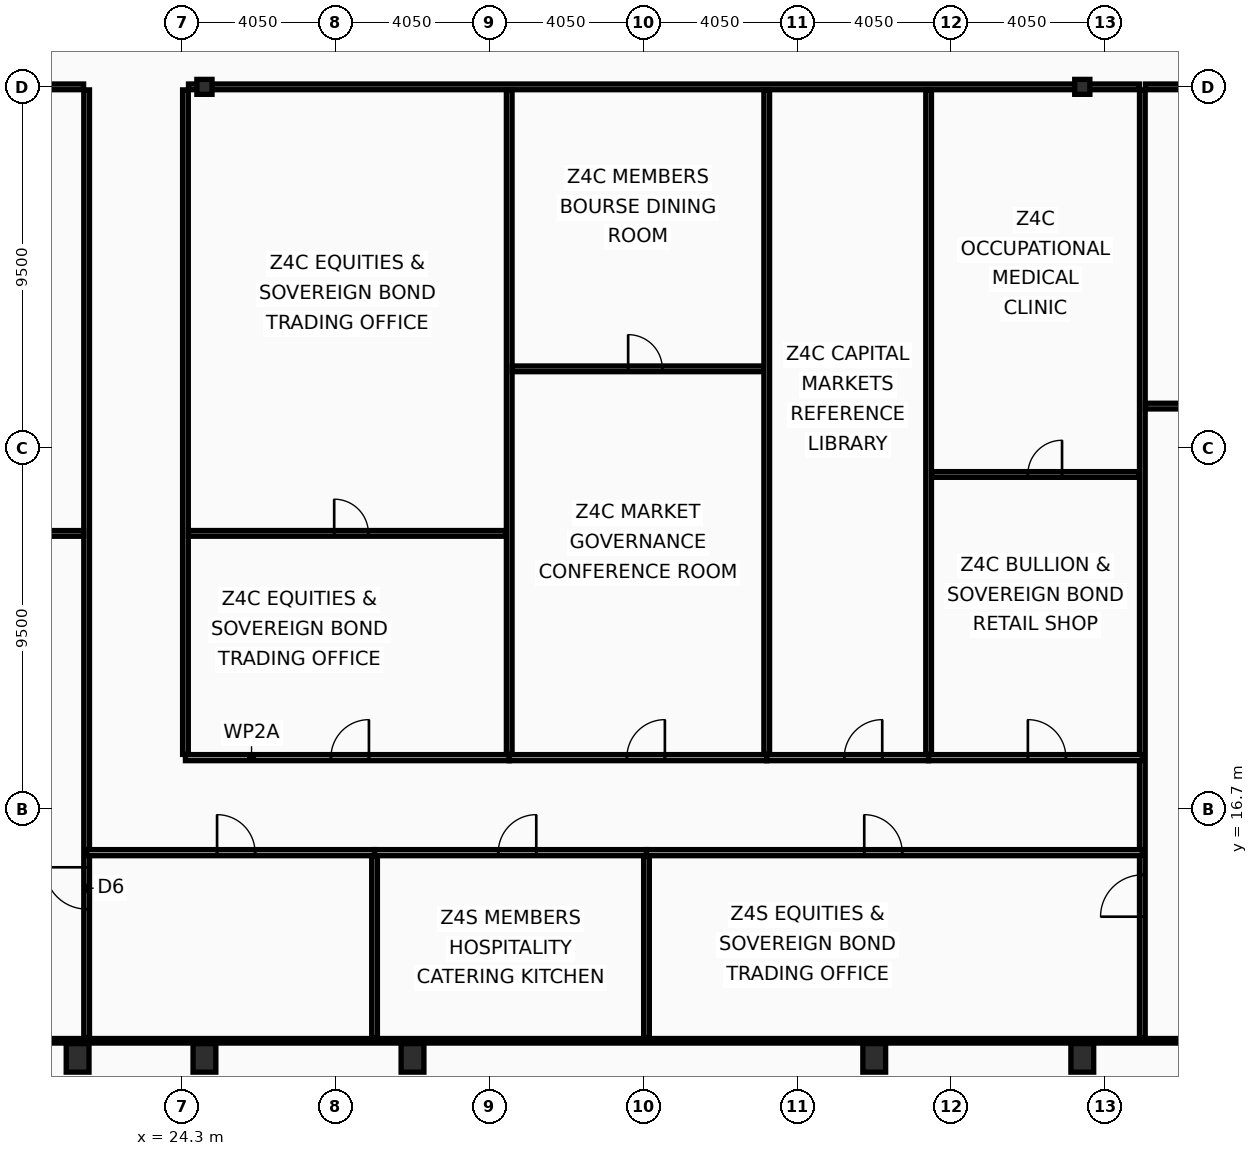
"""IFC4 building model, lengths in metres.
Left out: names, types, materials, properties, quantities, classifications, styles, units other than length and angle.
Written with IfcOpenShell. Run it as: python <this file> out.ifc"""

import sys

from ifc_helpers import new_model, si_unit, direction, frame, frame_2d, origin, origin_2d, place, context, subcontext, project, spatial, rectangle, hollow_rectangle, i_section, extrude, element, fill, save


model = new_model("IFC4")
c1 = context("Model", 3, precision=1e-05, world=origin(), true_north=direction((0.0, 1.0)))
c2 = subcontext(c1, "Body", "Model", "MODEL_VIEW")
j1 = project(units=[si_unit("LENGTHUNIT", "METRE"), si_unit("PLANEANGLEUNIT", "RADIAN")], contexts=[c1])
p1 = place(None, origin())
s1 = spatial("IfcSite", under=j1, at=p1, CompositionType="ELEMENT")
p2 = place(p1, origin())
s2 = spatial("IfcBuilding", under=s1, at=p2, CompositionType="ELEMENT")
p3 = place(p2, frame((0.0, 0.0, 280.6)))
s3 = spatial("IfcBuildingStorey", under=s2, at=p3, CompositionType="ELEMENT", Elevation=280.6)
for number, where, z_axis, x_axis in (
    (1, (21.562, 10.15, 0.0), (0.0, 0.0, 1.0), (1.0, 0.0, 0.0)),
    (2, (24.9, 10.15, 0.0), (0.0, 0.0, 1.0), (1.0, 0.0, 0.0)),
    (3, (30.375, 10.15, 0.0), (0.0, 0.0, 1.0), (1.0, 0.0, 0.0)),
    (4, (42.525, 10.15, 0.0), (0.0, 0.0, 1.0), (1.0, 0.0, 0.0)),
    (5, (48.0, 10.15, 0.0), (0.0, 0.0, 1.0), (1.0, 0.0, 0.0)),
):
    element("IfcColumn", number, at=place(p3, frame(where, z_axis=z_axis, x_axis=x_axis)), inside=s3, PredefinedType="COLUMN", context=c2, shape_type="SweptSolid", body=[
        extrude(hollow_rectangle(XDim=0.6, YDim=0.75, WallThickness=0.045, at=origin_2d()), origin(), (0.0, 0.0, 1.0), 3.6),
    ])
for number, where, z_axis, x_axis in (
    (6, (24.9, 35.7, 0.0), (0.0, 0.0, 1.0), (1.0, 0.0, 0.0)),
    (7, (48.0, 35.7, 0.0), (0.0, 0.0, 1.0), (1.0, 0.0, 0.0)),
):
    element("IfcColumn", number, at=place(p3, frame(where, z_axis=z_axis, x_axis=x_axis)), inside=s3, PredefinedType="COLUMN", context=c2, shape_type="SweptSolid", body=[
        extrude(i_section(OverallWidth=0.399, OverallDepth=0.393, WebThickness=0.023, FlangeThickness=0.037, at=origin_2d()), origin(), (0.0, 0.0, 1.0), 3.6),
    ])
p4 = place(p3, frame((21.8, 10.665, 0.0), z_axis=(0.0, 0.0, 1.0), x_axis=(0.0, 1.0, 0.0)))
e8 = element("IfcWall", 8, at=p4, inside=s3, PredefinedType="PARTITIONING", context=c2, shape_type="SweptSolid", body=[
    extrude(rectangle(XDim=24.955, YDim=0.15, at=frame_2d((12.478, 0.0))), origin(), (0.0, 0.0, 1.0), 3.03),
])
p5 = place(p4, frame((3.4, 0.0, 0.0)))
e9 = element("IfcOpeningElement", 9, at=p5, cuts=e8, PredefinedType="OPENING", context=c2, shape_type="SweptSolid", body=[
    extrude(rectangle(XDim=1.1, YDim=2.1, at=frame_2d((0.55, 1.05))), frame((0.0, 0.085, 0.0), z_axis=(0.0, -1.0, 0.0), x_axis=(1.0, 0.0, 0.0)), (0.0, 0.0, 1.0), 0.17),
])
p6 = place(p3, frame((10.095, 35.7, 0.0), z_axis=(0.0, 0.0, 1.0), x_axis=(1.0, 0.0, 0.0)))
e10 = element("IfcWall", 10, at=p6, inside=s3, PredefinedType="PARTITIONING", context=c2, shape_type="SweptSolid", body=[
    extrude(rectangle(XDim=11.625, YDim=0.15, at=frame_2d((5.812, 0.0))), origin(), (0.0, 0.0, 1.0), 2.78),
])
p7 = place(p6, frame((2.8, 0.0, 0.0)))
e11 = element("IfcOpeningElement", 11, at=p7, cuts=e10, PredefinedType="OPENING", context=c2, shape_type="SweptSolid", body=[
    extrude(rectangle(XDim=1.0, YDim=2.05, at=frame_2d((0.5, 1.025))), frame((0.0, 0.085, 0.0), z_axis=(0.0, -1.0, 0.0), x_axis=(1.0, 0.0, 0.0)), (0.0, 0.0, 1.0), 0.17),
])
p8 = place(p3, frame((10.095, 23.95, 0.0), z_axis=(0.0, 0.0, 1.0), x_axis=(1.0, 0.0, 0.0)))
e12 = element("IfcWall", 12, at=p8, inside=s3, PredefinedType="PARTITIONING", context=c2, shape_type="SweptSolid", body=[
    extrude(rectangle(XDim=11.625, YDim=0.15, at=frame_2d((5.812, 0.0))), origin(), (0.0, 0.0, 1.0), 2.78),
])
p9 = place(p8, frame((2.2, 0.0, 0.0)))
e13 = element("IfcOpeningElement", 13, at=p9, cuts=e12, PredefinedType="OPENING", context=c2, shape_type="SweptSolid", body=[
    extrude(rectangle(XDim=0.9, YDim=2.05, at=frame_2d((0.45, 1.025))), frame((0.0, 0.085, 0.0), z_axis=(0.0, -1.0, 0.0), x_axis=(1.0, 0.0, 0.0)), (0.0, 0.0, 1.0), 0.17),
])
p10 = place(p3, frame((24.4, 18.135, 0.0), z_axis=(0.0, 0.0, 1.0), x_axis=(0.0, 1.0, 0.0)))
e14 = element("IfcWall", 14, at=p10, inside=s3, PredefinedType="PARTITIONING", context=c2, shape_type="SweptSolid", body=[
    extrude(rectangle(XDim=17.485, YDim=0.15, at=frame_2d((8.743, 0.0))), origin(), (0.0, 0.0, 1.0), 2.78),
])
p11 = place(p3, frame((49.58, 10.665, 0.0), z_axis=(0.0, 0.0, 1.0), x_axis=(0.0, 1.0, 0.0)))
e15 = element("IfcWall", 15, at=p11, inside=s3, PredefinedType="PARTITIONING", context=c2, shape_type="SweptSolid", body=[
    extrude(rectangle(XDim=24.955, YDim=0.15, at=frame_2d((12.478, 0.0))), origin(), (0.0, 0.0, 1.0), 3.03),
])
p12 = place(p11, frame((3.2, 0.0, 0.0)))
e16 = element("IfcOpeningElement", 16, at=p12, cuts=e15, PredefinedType="OPENING", context=c2, shape_type="SweptSolid", body=[
    extrude(rectangle(XDim=1.1, YDim=2.1, at=frame_2d((0.55, 1.05))), frame((0.0, 0.085, 0.0), z_axis=(0.0, -1.0, 0.0), x_axis=(1.0, 0.0, 0.0)), (0.0, 0.0, 1.0), 0.17),
])
p13 = place(p3, frame((24.48, 35.7, 0.0), z_axis=(0.0, 0.0, 1.0), x_axis=(1.0, 0.0, 0.0)))
e17 = element("IfcWall", 17, at=p13, inside=s3, PredefinedType="PARTITIONING", context=c2, shape_type="SweptSolid", body=[
    extrude(rectangle(XDim=25.02, YDim=0.15, at=frame_2d((12.51, 0.0))), origin(), (0.0, 0.0, 1.0), 2.78),
])
p14 = place(p3, frame((49.66, 35.7, 0.0), z_axis=(0.0, 0.0, 1.0), x_axis=(1.0, 0.0, 0.0)))
e18 = element("IfcWall", 18, at=p14, inside=s3, PredefinedType="PARTITIONING", context=c2, shape_type="SweptSolid", body=[
    extrude(rectangle(XDim=13.145, YDim=0.15, at=frame_2d((6.573, 0.0))), origin(), (0.0, 0.0, 1.0), 2.78),
])
p15 = place(p14, frame((2.2, 0.0, 0.0)))
e19 = element("IfcOpeningElement", 19, at=p15, cuts=e18, PredefinedType="OPENING", context=c2, shape_type="SweptSolid", body=[
    extrude(rectangle(XDim=1.0, YDim=2.05, at=frame_2d((0.5, 1.025))), frame((0.0, 0.085, 0.0), z_axis=(0.0, -1.0, 0.0), x_axis=(1.0, 0.0, 0.0)), (0.0, 0.0, 1.0), 0.17),
])
p16 = place(p3, frame((49.66, 27.3, 0.0), z_axis=(0.0, 0.0, 1.0), x_axis=(1.0, 0.0, 0.0)))
e20 = element("IfcWall", 20, at=p16, inside=s3, PredefinedType="PARTITIONING", context=c2, shape_type="SweptSolid", body=[
    extrude(rectangle(XDim=13.145, YDim=0.15, at=frame_2d((6.573, 0.0))), origin(), (0.0, 0.0, 1.0), 2.78),
])
p17 = place(p16, frame((2.2, 0.0, 0.0)))
e21 = element("IfcOpeningElement", 21, at=p17, cuts=e20, PredefinedType="OPENING", context=c2, shape_type="SweptSolid", body=[
    extrude(rectangle(XDim=0.9, YDim=2.05, at=frame_2d((0.45, 1.025))), frame((0.0, 0.085, 0.0), z_axis=(0.0, -1.0, 0.0), x_axis=(1.0, 0.0, 0.0)), (0.0, 0.0, 1.0), 0.17),
])
p18 = place(p3, frame((24.4, 18.05, 0.0), z_axis=(0.0, 0.0, 1.0), x_axis=(1.0, 0.0, 0.0)))
e22 = element("IfcWall", 22, at=p18, inside=s3, PredefinedType="PARTITIONING", context=c2, shape_type="SweptSolid", body=[
    extrude(rectangle(XDim=8.52, YDim=0.16, at=frame_2d((4.26, 0.0))), origin(), (0.0, 0.0, 1.0), 2.78),
])
p19 = place(p18, frame((3.828, 0.0, 0.0)))
e23 = element("IfcOpeningElement", 23, at=p19, cuts=e22, PredefinedType="OPENING", context=c2, shape_type="SweptSolid", body=[
    extrude(rectangle(XDim=1.0, YDim=2.05, at=frame_2d((0.5, 1.025))), frame((0.0, 0.09, 0.0), z_axis=(0.0, -1.0, 0.0), x_axis=(1.0, 0.0, 0.0)), (0.0, 0.0, 1.0), 0.18),
])
p20 = place(p3, frame((24.48, 23.951, 0.0), z_axis=(0.0, 0.0, 1.0), x_axis=(1.0, 0.0, 0.0)))
e24 = element("IfcWall", 24, at=p20, inside=s3, PredefinedType="PARTITIONING", context=c2, shape_type="SweptSolid", body=[
    extrude(rectangle(XDim=8.36, YDim=0.15, at=frame_2d((4.18, 0.0))), origin(), (0.0, 0.0, 1.0), 2.78),
])
p21 = place(p20, frame((3.834, 0.0, 0.0)))
e25 = element("IfcOpeningElement", 25, at=p21, cuts=e24, PredefinedType="OPENING", context=c2, shape_type="SweptSolid", body=[
    extrude(rectangle(XDim=0.9, YDim=2.05, at=frame_2d((0.45, 1.025))), frame((0.0, 0.085, 0.0), z_axis=(0.0, -1.0, 0.0), x_axis=(1.0, 0.0, 0.0)), (0.0, 0.0, 1.0), 0.17),
])
p22 = place(p3, frame((32.92, 18.05, 0.0), z_axis=(0.0, 0.0, 1.0), x_axis=(1.0, 0.0, 0.0)))
e26 = element("IfcWall", 26, at=p22, inside=s3, PredefinedType="PARTITIONING", context=c2, shape_type="SweptSolid", body=[
    extrude(rectangle(XDim=6.776, YDim=0.16, at=frame_2d((3.388, 0.0))), origin(), (0.0, 0.0, 1.0), 3.44),
])
p23 = place(p22, frame((3.096, 0.0, 0.0)))
e27 = element("IfcOpeningElement", 27, at=p23, cuts=e26, PredefinedType="OPENING", context=c2, shape_type="SweptSolid", body=[
    extrude(rectangle(XDim=1.0, YDim=2.05, at=frame_2d((0.5, 1.025))), frame((0.0, 0.09, 0.0), z_axis=(0.0, -1.0, 0.0), x_axis=(1.0, 0.0, 0.0)), (0.0, 0.0, 1.0), 0.18),
])
p24 = place(p3, frame((32.92, 18.135, 0.0), z_axis=(0.0, 0.0, 1.0), x_axis=(0.0, 1.0, 0.0)))
e28 = element("IfcWall", 28, at=p24, inside=s3, PredefinedType="PARTITIONING", context=c2, shape_type="SweptSolid", body=[
    extrude(rectangle(XDim=17.485, YDim=0.15, at=frame_2d((8.743, 0.0))), origin(), (0.0, 0.0, 1.0), 3.03),
])
p25 = place(p3, frame((33.0, 28.28, 0.0), z_axis=(0.0, 0.0, 1.0), x_axis=(1.0, 0.0, 0.0)))
e29 = element("IfcWall", 29, at=p25, inside=s3, PredefinedType="PARTITIONING", context=c2, shape_type="SweptSolid", body=[
    extrude(rectangle(XDim=6.616, YDim=0.15, at=frame_2d((3.308, 0.0))), origin(), (0.0, 0.0, 1.0), 3.44),
])
p26 = place(p25, frame((3.049, 0.0, 0.0)))
e30 = element("IfcOpeningElement", 30, at=p26, cuts=e29, PredefinedType="OPENING", context=c2, shape_type="SweptSolid", body=[
    extrude(rectangle(XDim=0.9, YDim=2.05, at=frame_2d((0.45, 1.025))), frame((0.0, 0.085, 0.0), z_axis=(0.0, -1.0, 0.0), x_axis=(1.0, 0.0, 0.0)), (0.0, 0.0, 1.0), 0.17),
])
p27 = place(p3, frame((39.696, 18.05, 0.0), z_axis=(0.0, 0.0, 1.0), x_axis=(1.0, 0.0, 0.0)))
e31 = element("IfcWall", 31, at=p27, inside=s3, PredefinedType="PARTITIONING", context=c2, shape_type="SweptSolid", body=[
    extrude(rectangle(XDim=4.26, YDim=0.16, at=frame_2d((2.13, 0.0))), origin(), (0.0, 0.0, 1.0), 2.78),
])
p28 = place(p27, frame((2.039, 0.0, 0.0)))
e32 = element("IfcOpeningElement", 32, at=p28, cuts=e31, PredefinedType="OPENING", context=c2, shape_type="SweptSolid", body=[
    extrude(rectangle(XDim=1.0, YDim=2.05, at=frame_2d((0.5, 1.025))), frame((0.0, 0.09, 0.0), z_axis=(0.0, -1.0, 0.0), x_axis=(1.0, 0.0, 0.0)), (0.0, 0.0, 1.0), 0.18),
])
p29 = place(p3, frame((39.696, 18.135, 0.0), z_axis=(0.0, 0.0, 1.0), x_axis=(0.0, 1.0, 0.0)))
e33 = element("IfcWall", 33, at=p29, inside=s3, PredefinedType="PARTITIONING", context=c2, shape_type="SweptSolid", body=[
    extrude(rectangle(XDim=17.485, YDim=0.15, at=frame_2d((8.743, 0.0))), origin(), (0.0, 0.0, 1.0), 3.03),
])
p30 = place(p3, frame((43.956, 18.05, 0.0), z_axis=(0.0, 0.0, 1.0), x_axis=(1.0, 0.0, 0.0)))
e34 = element("IfcWall", 34, at=p30, inside=s3, PredefinedType="PARTITIONING", context=c2, shape_type="SweptSolid", body=[
    extrude(rectangle(XDim=5.624, YDim=0.16, at=frame_2d((2.812, 0.0))), origin(), (0.0, 0.0, 1.0), 2.78),
])
p31 = place(p30, frame((2.612, 0.0, 0.0)))
e35 = element("IfcOpeningElement", 35, at=p31, cuts=e34, PredefinedType="OPENING", context=c2, shape_type="SweptSolid", body=[
    extrude(rectangle(XDim=1.0, YDim=2.05, at=frame_2d((0.5, 1.025))), frame((0.0, 0.09, 0.0), z_axis=(0.0, -1.0, 0.0), x_axis=(1.0, 0.0, 0.0)), (0.0, 0.0, 1.0), 0.18),
])
p32 = place(p3, frame((43.956, 18.135, 0.0), z_axis=(0.0, 0.0, 1.0), x_axis=(0.0, 1.0, 0.0)))
e36 = element("IfcWall", 36, at=p32, inside=s3, PredefinedType="PARTITIONING", context=c2, shape_type="SweptSolid", body=[
    extrude(rectangle(XDim=17.485, YDim=0.15, at=frame_2d((8.743, 0.0))), origin(), (0.0, 0.0, 1.0), 3.03),
])
p33 = place(p3, frame((44.036, 25.501, 0.0), z_axis=(0.0, 0.0, 1.0), x_axis=(1.0, 0.0, 0.0)))
e37 = element("IfcWall", 37, at=p33, inside=s3, PredefinedType="PARTITIONING", context=c2, shape_type="SweptSolid", body=[
    extrude(rectangle(XDim=5.464, YDim=0.15, at=frame_2d((2.732, 0.0))), origin(), (0.0, 0.0, 1.0), 2.78),
])
p34 = place(p33, frame((2.531, 0.0, 0.0)))
e38 = element("IfcOpeningElement", 38, at=p34, cuts=e37, PredefinedType="OPENING", context=c2, shape_type="SweptSolid", body=[
    extrude(rectangle(XDim=0.9, YDim=2.05, at=frame_2d((0.45, 1.025))), frame((0.0, 0.085, 0.0), z_axis=(0.0, -1.0, 0.0), x_axis=(1.0, 0.0, 0.0)), (0.0, 0.0, 1.0), 0.17),
])
p35 = place(p3, frame((21.8, 15.55, 0.0), z_axis=(0.0, 0.0, 1.0), x_axis=(1.0, 0.0, 0.0)))
e39 = element("IfcWall", 39, at=p35, inside=s3, PredefinedType="PARTITIONING", context=c2, shape_type="SweptSolid", body=[
    extrude(rectangle(XDim=7.576, YDim=0.16, at=frame_2d((3.788, 0.0))), origin(), (0.0, 0.0, 1.0), 2.78),
])
p36 = place(p35, frame((3.432, 0.0, 0.0)))
e40 = element("IfcOpeningElement", 40, at=p36, cuts=e39, PredefinedType="OPENING", context=c2, shape_type="SweptSolid", body=[
    extrude(rectangle(XDim=1.0, YDim=2.05, at=frame_2d((0.5, 1.025))), frame((0.0, 0.09, 0.0), z_axis=(0.0, -1.0, 0.0), x_axis=(1.0, 0.0, 0.0)), (0.0, 0.0, 1.0), 0.18),
])
p37 = place(p3, frame((29.376, 15.55, 0.0), z_axis=(0.0, 0.0, 1.0), x_axis=(1.0, 0.0, 0.0)))
e41 = element("IfcWall", 41, at=p37, inside=s3, PredefinedType="PARTITIONING", context=c2, shape_type="SweptSolid", body=[
    extrude(rectangle(XDim=7.155, YDim=0.16, at=frame_2d((3.578, 0.0))), origin(), (0.0, 0.0, 1.0), 2.78),
])
p38 = place(p37, frame((3.255, 0.0, 0.0)))
e42 = element("IfcOpeningElement", 42, at=p38, cuts=e41, PredefinedType="OPENING", context=c2, shape_type="SweptSolid", body=[
    extrude(rectangle(XDim=1.0, YDim=2.05, at=frame_2d((0.5, 1.025))), frame((0.0, 0.09, 0.0), z_axis=(0.0, -1.0, 0.0), x_axis=(1.0, 0.0, 0.0)), (0.0, 0.0, 1.0), 0.18),
])
p39 = place(p3, frame((29.376, 10.665, 0.0), z_axis=(0.0, 0.0, 1.0), x_axis=(0.0, 1.0, 0.0)))
e43 = element("IfcWall", 43, at=p39, inside=s3, PredefinedType="PARTITIONING", context=c2, shape_type="SweptSolid", body=[
    extrude(rectangle(XDim=4.8, YDim=0.15, at=frame_2d((2.4, 0.0))), origin(), (0.0, 0.0, 1.0), 3.44),
])
p40 = place(p3, frame((36.532, 15.55, 0.0), z_axis=(0.0, 0.0, 1.0), x_axis=(1.0, 0.0, 0.0)))
e44 = element("IfcWall", 44, at=p40, inside=s3, PredefinedType="PARTITIONING", context=c2, shape_type="SweptSolid", body=[
    extrude(rectangle(XDim=13.048, YDim=0.16, at=frame_2d((6.524, 0.0))), origin(), (0.0, 0.0, 1.0), 2.78),
])
p41 = place(p40, frame((5.73, 0.0, 0.0)))
e45 = element("IfcOpeningElement", 45, at=p41, cuts=e44, PredefinedType="OPENING", context=c2, shape_type="SweptSolid", body=[
    extrude(rectangle(XDim=1.0, YDim=2.05, at=frame_2d((0.5, 1.025))), frame((0.0, 0.09, 0.0), z_axis=(0.0, -1.0, 0.0), x_axis=(1.0, 0.0, 0.0)), (0.0, 0.0, 1.0), 0.18),
])
p42 = place(p3, frame((36.532, 10.665, 0.0), z_axis=(0.0, 0.0, 1.0), x_axis=(0.0, 1.0, 0.0)))
e46 = element("IfcWall", 46, at=p42, inside=s3, PredefinedType="PARTITIONING", context=c2, shape_type="SweptSolid", body=[
    extrude(rectangle(XDim=4.8, YDim=0.15, at=frame_2d((2.4, 0.0))), origin(), (0.0, 0.0, 1.0), 3.44),
])
p43 = place(p3, frame((10.095, 10.6, 0.0), z_axis=(0.0, 0.0, 1.0), x_axis=(1.0, 0.0, 0.0)))
e47 = element("IfcWall", 47, at=p43, inside=s3, PredefinedType="PARTITIONING", context=c2, shape_type="SweptSolid", body=[
    extrude(rectangle(XDim=52.71, YDim=0.12, at=frame_2d((26.355, 0.0))), origin(), (0.0, 0.0, 1.0), 2.78),
])
p44 = place(p5, origin())
e48 = element("IfcDoor", 48, at=p44, inside=s3, OperationType="SINGLE_SWING_RIGHT", PredefinedType="DOOR", context=c2, shape_type="SweptSolid", body=[
    extrude(rectangle(XDim=1.1, YDim=2.1, at=frame_2d((0.55, 1.05))), frame((0.0, 0.025, 0.0), z_axis=(0.0, -1.0, 0.0), x_axis=(1.0, 0.0, 0.0)), (0.0, 0.0, 1.0), 0.05),
])
fill(e9, e48)
p45 = place(p12, origin())
e49 = element("IfcDoor", 49, at=p45, inside=s3, OperationType="SINGLE_SWING_LEFT", PredefinedType="DOOR", context=c2, shape_type="SweptSolid", body=[
    extrude(rectangle(XDim=1.1, YDim=2.1, at=frame_2d((0.55, 1.05))), frame((0.0, 0.025, 0.0), z_axis=(0.0, -1.0, 0.0), x_axis=(1.0, 0.0, 0.0)), (0.0, 0.0, 1.0), 0.05),
])
fill(e16, e49)
p46 = place(p19, origin())
e50 = element("IfcDoor", 50, at=p46, inside=s3, OperationType="SINGLE_SWING_RIGHT", PredefinedType="DOOR", context=c2, shape_type="SweptSolid", body=[
    extrude(rectangle(XDim=1.0, YDim=2.05, at=frame_2d((0.5, 1.025))), frame((0.0, 0.025, 0.0), z_axis=(0.0, -1.0, 0.0), x_axis=(1.0, 0.0, 0.0)), (0.0, 0.0, 1.0), 0.05),
])
fill(e23, e50)
p47 = place(p21, origin())
e51 = element("IfcDoor", 51, at=p47, inside=s3, OperationType="SINGLE_SWING_LEFT", PredefinedType="DOOR", context=c2, shape_type="SweptSolid", body=[
    extrude(rectangle(XDim=0.9, YDim=2.05, at=frame_2d((0.45, 1.025))), frame((0.0, 0.025, 0.0), z_axis=(0.0, -1.0, 0.0), x_axis=(1.0, 0.0, 0.0)), (0.0, 0.0, 1.0), 0.05),
])
fill(e25, e51)
p48 = place(p23, origin())
e52 = element("IfcDoor", 52, at=p48, inside=s3, OperationType="SINGLE_SWING_RIGHT", PredefinedType="DOOR", context=c2, shape_type="SweptSolid", body=[
    extrude(rectangle(XDim=1.0, YDim=2.05, at=frame_2d((0.5, 1.025))), frame((0.0, 0.025, 0.0), z_axis=(0.0, -1.0, 0.0), x_axis=(1.0, 0.0, 0.0)), (0.0, 0.0, 1.0), 0.05),
])
fill(e27, e52)
p49 = place(p26, origin())
e53 = element("IfcDoor", 53, at=p49, inside=s3, OperationType="SINGLE_SWING_LEFT", PredefinedType="DOOR", context=c2, shape_type="SweptSolid", body=[
    extrude(rectangle(XDim=0.9, YDim=2.05, at=frame_2d((0.45, 1.025))), frame((0.0, 0.025, 0.0), z_axis=(0.0, -1.0, 0.0), x_axis=(1.0, 0.0, 0.0)), (0.0, 0.0, 1.0), 0.05),
])
fill(e30, e53)
p50 = place(p28, origin())
e54 = element("IfcDoor", 54, at=p50, inside=s3, OperationType="SINGLE_SWING_RIGHT", PredefinedType="DOOR", context=c2, shape_type="SweptSolid", body=[
    extrude(rectangle(XDim=1.0, YDim=2.05, at=frame_2d((0.5, 1.025))), frame((0.0, 0.025, 0.0), z_axis=(0.0, -1.0, 0.0), x_axis=(1.0, 0.0, 0.0)), (0.0, 0.0, 1.0), 0.05),
])
fill(e32, e54)
p51 = place(p31, origin())
e55 = element("IfcDoor", 55, at=p51, inside=s3, OperationType="SINGLE_SWING_LEFT", PredefinedType="DOOR", context=c2, shape_type="SweptSolid", body=[
    extrude(rectangle(XDim=1.0, YDim=2.05, at=frame_2d((0.5, 1.025))), frame((0.0, 0.025, 0.0), z_axis=(0.0, -1.0, 0.0), x_axis=(1.0, 0.0, 0.0)), (0.0, 0.0, 1.0), 0.05),
])
fill(e35, e55)
p52 = place(p34, origin())
e56 = element("IfcDoor", 56, at=p52, inside=s3, OperationType="SINGLE_SWING_RIGHT", PredefinedType="DOOR", context=c2, shape_type="SweptSolid", body=[
    extrude(rectangle(XDim=0.9, YDim=2.05, at=frame_2d((0.45, 1.025))), frame((0.0, 0.025, 0.0), z_axis=(0.0, -1.0, 0.0), x_axis=(1.0, 0.0, 0.0)), (0.0, 0.0, 1.0), 0.05),
])
fill(e38, e56)
p53 = place(p36, origin())
e57 = element("IfcDoor", 57, at=p53, inside=s3, OperationType="SINGLE_SWING_LEFT", PredefinedType="DOOR", context=c2, shape_type="SweptSolid", body=[
    extrude(rectangle(XDim=1.0, YDim=2.05, at=frame_2d((0.5, 1.025))), frame((0.0, 0.025, 0.0), z_axis=(0.0, -1.0, 0.0), x_axis=(1.0, 0.0, 0.0)), (0.0, 0.0, 1.0), 0.05),
])
fill(e40, e57)
p54 = place(p38, origin())
e58 = element("IfcDoor", 58, at=p54, inside=s3, OperationType="SINGLE_SWING_RIGHT", PredefinedType="DOOR", context=c2, shape_type="SweptSolid", body=[
    extrude(rectangle(XDim=1.0, YDim=2.05, at=frame_2d((0.5, 1.025))), frame((0.0, 0.025, 0.0), z_axis=(0.0, -1.0, 0.0), x_axis=(1.0, 0.0, 0.0)), (0.0, 0.0, 1.0), 0.05),
])
fill(e42, e58)
p55 = place(p41, origin())
e59 = element("IfcDoor", 59, at=p55, inside=s3, OperationType="SINGLE_SWING_LEFT", PredefinedType="DOOR", context=c2, shape_type="SweptSolid", body=[
    extrude(rectangle(XDim=1.0, YDim=2.05, at=frame_2d((0.5, 1.025))), frame((0.0, 0.025, 0.0), z_axis=(0.0, -1.0, 0.0), x_axis=(1.0, 0.0, 0.0)), (0.0, 0.0, 1.0), 0.05),
])
fill(e45, e59)
save(model, sys.argv[1])
